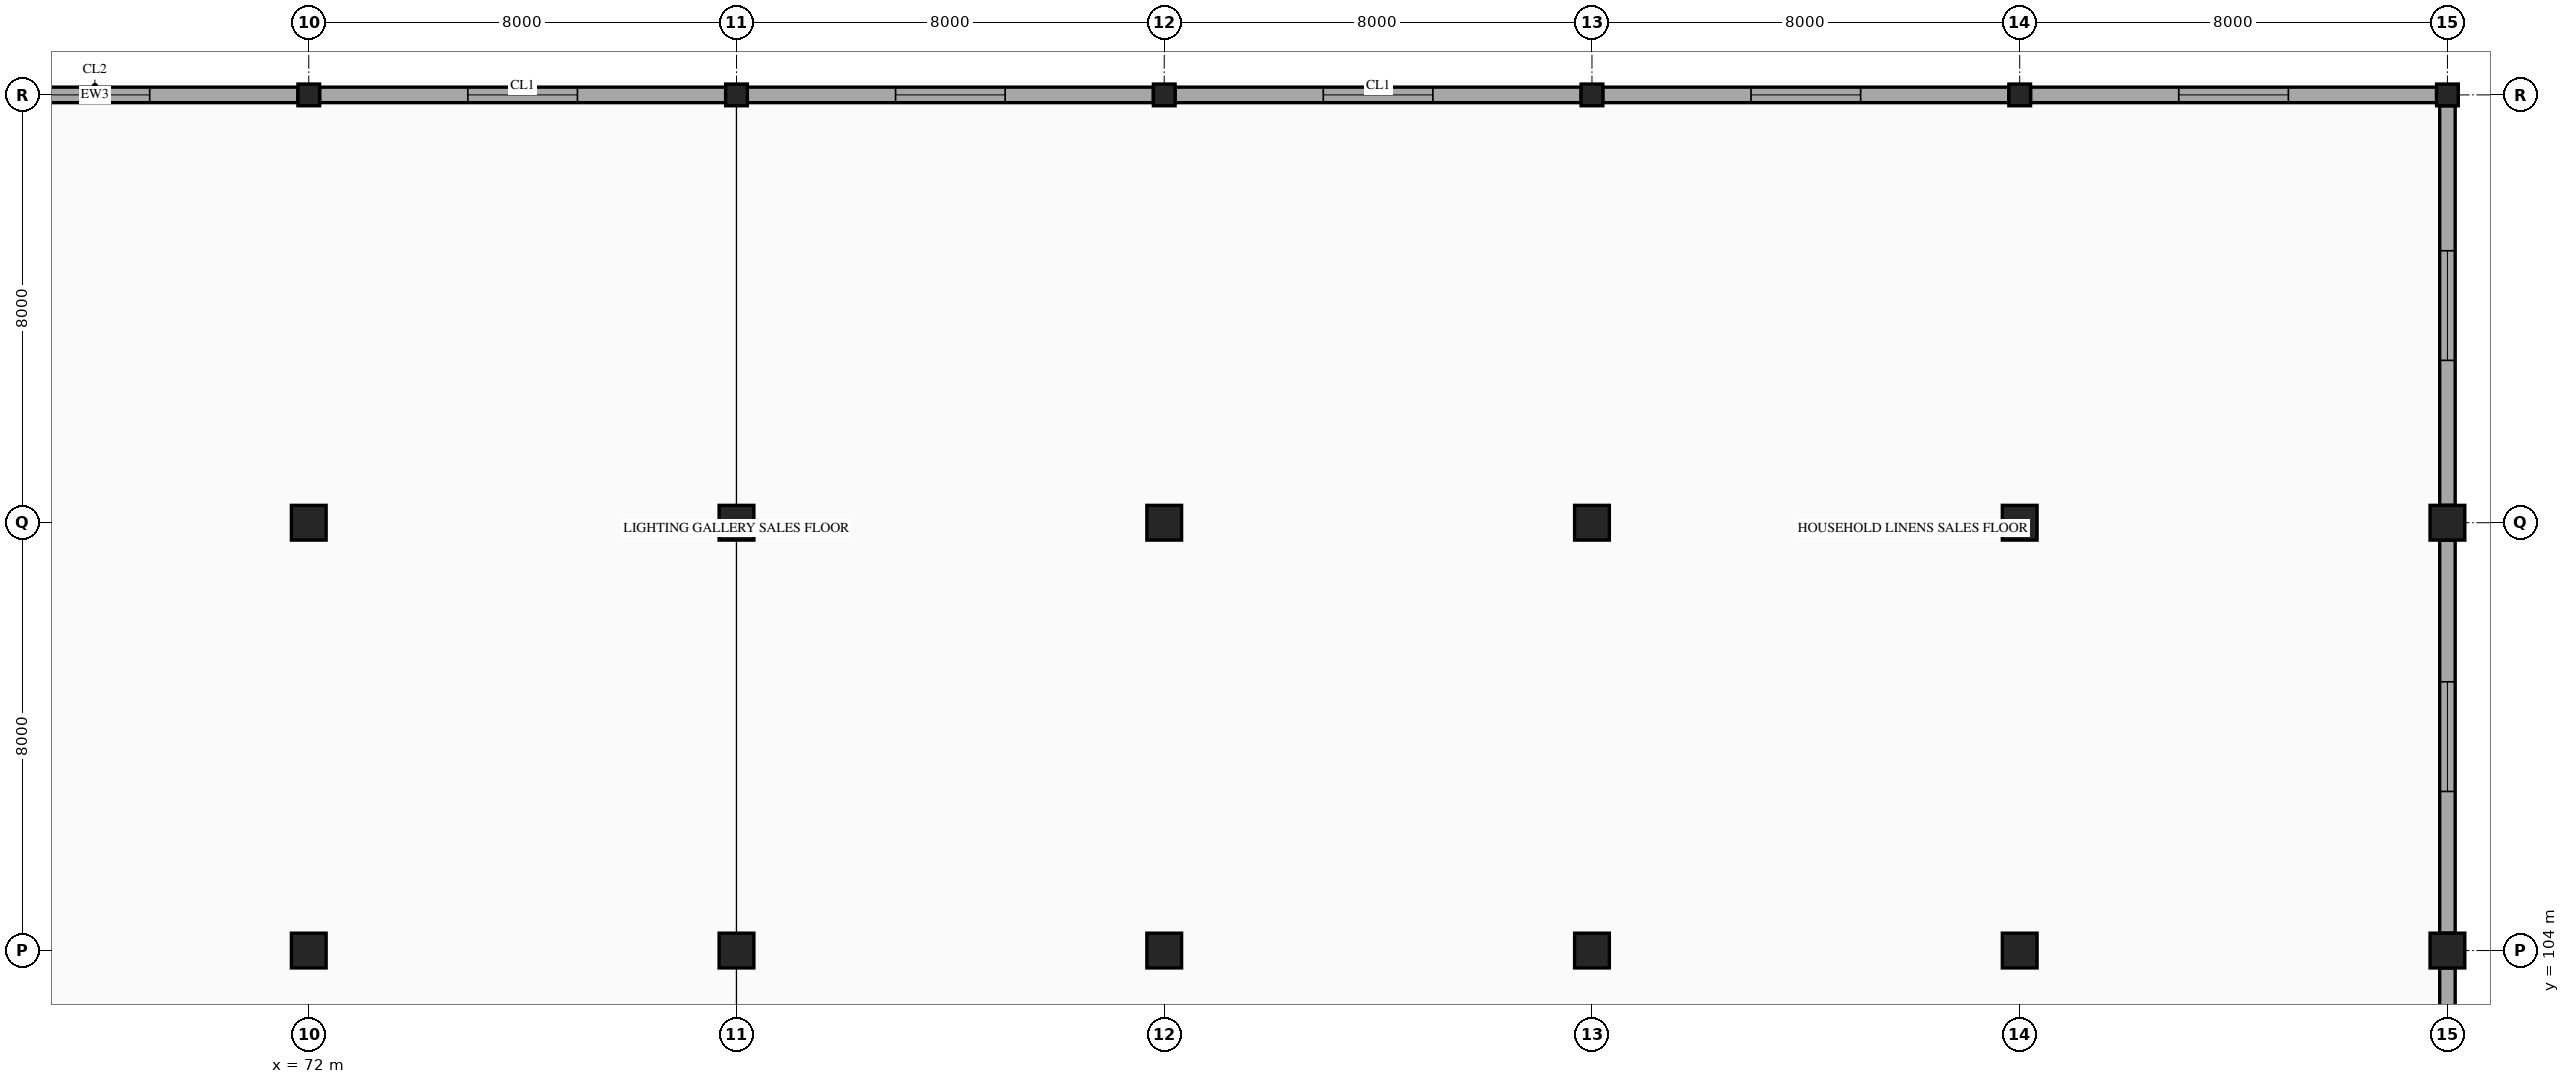
"""IFC4 building model, lengths in metres.
Left out: names, types, materials, properties, quantities, classifications, styles, units other than length and angle.
Written with IfcOpenShell. Run it as: python <this file> out.ifc"""

import sys

from ifc_helpers import new_model, si_unit, direction, frame, frame_2d, origin, origin_2d, place, context, subcontext, project, spatial, rectangle, hollow_rectangle, extrude, element, fill, save


model = new_model("IFC4")
c1 = context("Model", 3, precision=1e-05, world=origin(), true_north=direction((0.0, 1.0)))
c2 = subcontext(c1, "Body", "Model", "MODEL_VIEW")
j1 = project(units=[si_unit("LENGTHUNIT", "METRE"), si_unit("PLANEANGLEUNIT", "RADIAN")], contexts=[c1])
p1 = place(None, origin())
s1 = spatial("IfcSite", under=j1, at=p1, CompositionType="ELEMENT")
p2 = place(p1, origin())
s2 = spatial("IfcBuilding", under=s1, at=p2, CompositionType="ELEMENT")
p3 = place(p2, frame((0.0, 0.0, 19.4)))
s3 = spatial("IfcBuildingStorey", under=s2, at=p3, CompositionType="ELEMENT", Elevation=19.4)
for number, where, z_axis, x_axis in (
    (1, (72.0, 104.0, 0.0), (0.0, 0.0, 1.0), (1.0, 0.0, 0.0)),
    (2, (72.0, 112.0, 0.0), (0.0, 0.0, 1.0), (1.0, 0.0, 0.0)),
):
    element("IfcColumn", number, at=place(p3, frame(where, z_axis=z_axis, x_axis=x_axis)), inside=s3, PredefinedType="COLUMN", context=c2, shape_type="SweptSolid", body=[
        extrude(rectangle(XDim=0.65, YDim=0.65, at=origin_2d()), origin(), (0.0, 0.0, 1.0), 4.5),
    ])
p4 = place(p3, frame((72.0, 120.0, 0.0), z_axis=(0.0, 0.0, 1.0), x_axis=(1.0, 0.0, 0.0)))
e3 = element("IfcColumn", 3, at=p4, inside=s3, PredefinedType="COLUMN", context=c2, shape_type="SweptSolid", body=[
    extrude(hollow_rectangle(XDim=0.406, YDim=0.406, WallThickness=0.015, InnerFilletRadius=0.015, OuterFilletRadius=0.029, at=origin_2d()), origin(), (0.0, 0.0, 1.0), 4.5),
])
for number, where, z_axis, x_axis in (
    (4, (80.0, 104.0, 0.0), (0.0, 0.0, 1.0), (1.0, 0.0, 0.0)),
    (5, (80.0, 112.0, 0.0), (0.0, 0.0, 1.0), (1.0, 0.0, 0.0)),
):
    element("IfcColumn", number, at=place(p3, frame(where, z_axis=z_axis, x_axis=x_axis)), inside=s3, PredefinedType="COLUMN", context=c2, shape_type="SweptSolid", body=[
        extrude(rectangle(XDim=0.65, YDim=0.65, at=origin_2d()), origin(), (0.0, 0.0, 1.0), 4.5),
    ])
p5 = place(p3, frame((80.0, 120.0, 0.0), z_axis=(0.0, 0.0, 1.0), x_axis=(1.0, 0.0, 0.0)))
e6 = element("IfcColumn", 6, at=p5, inside=s3, PredefinedType="COLUMN", context=c2, shape_type="SweptSolid", body=[
    extrude(hollow_rectangle(XDim=0.406, YDim=0.406, WallThickness=0.015, InnerFilletRadius=0.015, OuterFilletRadius=0.029, at=origin_2d()), origin(), (0.0, 0.0, 1.0), 4.5),
])
for number, where, z_axis, x_axis in (
    (7, (88.0, 104.0, 0.0), (0.0, 0.0, 1.0), (1.0, 0.0, 0.0)),
    (8, (88.0, 112.0, 0.0), (0.0, 0.0, 1.0), (1.0, 0.0, 0.0)),
):
    element("IfcColumn", number, at=place(p3, frame(where, z_axis=z_axis, x_axis=x_axis)), inside=s3, PredefinedType="COLUMN", context=c2, shape_type="SweptSolid", body=[
        extrude(rectangle(XDim=0.65, YDim=0.65, at=origin_2d()), origin(), (0.0, 0.0, 1.0), 4.5),
    ])
p6 = place(p3, frame((88.0, 120.0, 0.0), z_axis=(0.0, 0.0, 1.0), x_axis=(1.0, 0.0, 0.0)))
e9 = element("IfcColumn", 9, at=p6, inside=s3, PredefinedType="COLUMN", context=c2, shape_type="SweptSolid", body=[
    extrude(hollow_rectangle(XDim=0.406, YDim=0.406, WallThickness=0.015, InnerFilletRadius=0.015, OuterFilletRadius=0.029, at=origin_2d()), origin(), (0.0, 0.0, 1.0), 4.5),
])
for number, where, z_axis, x_axis in (
    (10, (96.0, 104.0, 0.0), (0.0, 0.0, 1.0), (1.0, 0.0, 0.0)),
    (11, (96.0, 112.0, 0.0), (0.0, 0.0, 1.0), (1.0, 0.0, 0.0)),
):
    element("IfcColumn", number, at=place(p3, frame(where, z_axis=z_axis, x_axis=x_axis)), inside=s3, PredefinedType="COLUMN", context=c2, shape_type="SweptSolid", body=[
        extrude(rectangle(XDim=0.65, YDim=0.65, at=origin_2d()), origin(), (0.0, 0.0, 1.0), 4.5),
    ])
p7 = place(p3, frame((96.0, 120.0, 0.0), z_axis=(0.0, 0.0, 1.0), x_axis=(1.0, 0.0, 0.0)))
e12 = element("IfcColumn", 12, at=p7, inside=s3, PredefinedType="COLUMN", context=c2, shape_type="SweptSolid", body=[
    extrude(hollow_rectangle(XDim=0.406, YDim=0.406, WallThickness=0.015, InnerFilletRadius=0.015, OuterFilletRadius=0.029, at=origin_2d()), origin(), (0.0, 0.0, 1.0), 4.5),
])
for number, where, z_axis, x_axis in (
    (13, (104.0, 104.0, 0.0), (0.0, 0.0, 1.0), (1.0, 0.0, 0.0)),
    (14, (104.0, 112.0, 0.0), (0.0, 0.0, 1.0), (1.0, 0.0, 0.0)),
):
    element("IfcColumn", number, at=place(p3, frame(where, z_axis=z_axis, x_axis=x_axis)), inside=s3, PredefinedType="COLUMN", context=c2, shape_type="SweptSolid", body=[
        extrude(rectangle(XDim=0.65, YDim=0.65, at=origin_2d()), origin(), (0.0, 0.0, 1.0), 4.5),
    ])
p8 = place(p3, frame((104.0, 120.0, 0.0), z_axis=(0.0, 0.0, 1.0), x_axis=(1.0, 0.0, 0.0)))
e15 = element("IfcColumn", 15, at=p8, inside=s3, PredefinedType="COLUMN", context=c2, shape_type="SweptSolid", body=[
    extrude(hollow_rectangle(XDim=0.406, YDim=0.406, WallThickness=0.015, InnerFilletRadius=0.015, OuterFilletRadius=0.029, at=origin_2d()), origin(), (0.0, 0.0, 1.0), 4.5),
])
for number, where, z_axis, x_axis in (
    (16, (112.0, 104.0, 0.0), (0.0, 0.0, 1.0), (1.0, 0.0, 0.0)),
    (17, (112.0, 112.0, 0.0), (0.0, 0.0, 1.0), (1.0, 0.0, 0.0)),
):
    element("IfcColumn", number, at=place(p3, frame(where, z_axis=z_axis, x_axis=x_axis)), inside=s3, PredefinedType="COLUMN", context=c2, shape_type="SweptSolid", body=[
        extrude(rectangle(XDim=0.65, YDim=0.65, at=origin_2d()), origin(), (0.0, 0.0, 1.0), 4.5),
    ])
p9 = place(p3, frame((112.0, 120.0, 0.0), z_axis=(0.0, 0.0, 1.0), x_axis=(1.0, 0.0, 0.0)))
e18 = element("IfcColumn", 18, at=p9, inside=s3, PredefinedType="COLUMN", context=c2, shape_type="SweptSolid", body=[
    extrude(hollow_rectangle(XDim=0.406, YDim=0.406, WallThickness=0.015, InnerFilletRadius=0.015, OuterFilletRadius=0.029, at=origin_2d()), origin(), (0.0, 0.0, 1.0), 4.5),
])
p10 = place(p3, frame((64.203, 120.0, 0.0), z_axis=(0.0, 0.0, 1.0), x_axis=(1.0, 0.0, 0.0)))
e19 = element("IfcWall", 19, at=p10, inside=s3, PredefinedType="STANDARD", context=c2, shape_type="SweptSolid", body=[
    extrude(rectangle(XDim=7.594, YDim=0.29, at=frame_2d((3.797, 0.0))), origin(), (0.0, 0.0, 1.0), 3.48),
])
p11 = place(p10, frame((2.772, 0.0, 0.8)))
e20 = element("IfcOpeningElement", 20, at=p11, cuts=e19, PredefinedType="OPENING", context=c2, shape_type="SweptSolid", body=[
    extrude(rectangle(XDim=2.05, YDim=1.95, at=frame_2d((1.025, 0.975))), frame((0.0, 0.155, 0.0), z_axis=(0.0, -1.0, 0.0), x_axis=(1.0, 0.0, 0.0)), (0.0, 0.0, 1.0), 0.31),
])
p12 = place(p3, frame((72.203, 120.0, 0.0), z_axis=(0.0, 0.0, 1.0), x_axis=(1.0, 0.0, 0.0)))
e21 = element("IfcWall", 21, at=p12, inside=s3, PredefinedType="STANDARD", context=c2, shape_type="SweptSolid", body=[
    extrude(rectangle(XDim=7.594, YDim=0.29, at=frame_2d((3.797, 0.0))), origin(), (0.0, 0.0, 1.0), 3.48),
])
p13 = place(p12, frame((2.772, 0.0, 0.8)))
e22 = element("IfcOpeningElement", 22, at=p13, cuts=e21, PredefinedType="OPENING", context=c2, shape_type="SweptSolid", body=[
    extrude(rectangle(XDim=2.05, YDim=1.95, at=frame_2d((1.025, 0.975))), frame((0.0, 0.155, 0.0), z_axis=(0.0, -1.0, 0.0), x_axis=(1.0, 0.0, 0.0)), (0.0, 0.0, 1.0), 0.31),
])
p14 = place(p3, frame((80.203, 120.0, 0.0), z_axis=(0.0, 0.0, 1.0), x_axis=(1.0, 0.0, 0.0)))
e23 = element("IfcWall", 23, at=p14, inside=s3, PredefinedType="STANDARD", context=c2, shape_type="SweptSolid", body=[
    extrude(rectangle(XDim=7.594, YDim=0.29, at=frame_2d((3.797, 0.0))), origin(), (0.0, 0.0, 1.0), 3.48),
])
p15 = place(p14, frame((2.772, 0.0, 0.8)))
e24 = element("IfcOpeningElement", 24, at=p15, cuts=e23, PredefinedType="OPENING", context=c2, shape_type="SweptSolid", body=[
    extrude(rectangle(XDim=2.05, YDim=1.95, at=frame_2d((1.025, 0.975))), frame((0.0, 0.155, 0.0), z_axis=(0.0, -1.0, 0.0), x_axis=(1.0, 0.0, 0.0)), (0.0, 0.0, 1.0), 0.31),
])
p16 = place(p3, frame((88.203, 120.0, 0.0), z_axis=(0.0, 0.0, 1.0), x_axis=(1.0, 0.0, 0.0)))
e25 = element("IfcWall", 25, at=p16, inside=s3, PredefinedType="STANDARD", context=c2, shape_type="SweptSolid", body=[
    extrude(rectangle(XDim=7.594, YDim=0.29, at=frame_2d((3.797, 0.0))), origin(), (0.0, 0.0, 1.0), 3.48),
])
p17 = place(p16, frame((2.772, 0.0, 0.8)))
e26 = element("IfcOpeningElement", 26, at=p17, cuts=e25, PredefinedType="OPENING", context=c2, shape_type="SweptSolid", body=[
    extrude(rectangle(XDim=2.05, YDim=1.95, at=frame_2d((1.025, 0.975))), frame((0.0, 0.155, 0.0), z_axis=(0.0, -1.0, 0.0), x_axis=(1.0, 0.0, 0.0)), (0.0, 0.0, 1.0), 0.31),
])
p18 = place(p3, frame((96.203, 120.0, 0.0), z_axis=(0.0, 0.0, 1.0), x_axis=(1.0, 0.0, 0.0)))
e27 = element("IfcWall", 27, at=p18, inside=s3, PredefinedType="STANDARD", context=c2, shape_type="SweptSolid", body=[
    extrude(rectangle(XDim=7.594, YDim=0.29, at=frame_2d((3.797, 0.0))), origin(), (0.0, 0.0, 1.0), 3.48),
])
p19 = place(p18, frame((2.772, 0.0, 0.8)))
e28 = element("IfcOpeningElement", 28, at=p19, cuts=e27, PredefinedType="OPENING", context=c2, shape_type="SweptSolid", body=[
    extrude(rectangle(XDim=2.05, YDim=1.95, at=frame_2d((1.025, 0.975))), frame((0.0, 0.155, 0.0), z_axis=(0.0, -1.0, 0.0), x_axis=(1.0, 0.0, 0.0)), (0.0, 0.0, 1.0), 0.31),
])
p20 = place(p3, frame((104.203, 120.0, 0.0), z_axis=(0.0, 0.0, 1.0), x_axis=(1.0, 0.0, 0.0)))
e29 = element("IfcWall", 29, at=p20, inside=s3, PredefinedType="STANDARD", context=c2, shape_type="SweptSolid", body=[
    extrude(rectangle(XDim=7.594, YDim=0.29, at=frame_2d((3.797, 0.0))), origin(), (0.0, 0.0, 1.0), 3.48),
])
p21 = place(p20, frame((2.772, 0.0, 0.8)))
e30 = element("IfcOpeningElement", 30, at=p21, cuts=e29, PredefinedType="OPENING", context=c2, shape_type="SweptSolid", body=[
    extrude(rectangle(XDim=2.05, YDim=1.95, at=frame_2d((1.025, 0.975))), frame((0.0, 0.155, 0.0), z_axis=(0.0, -1.0, 0.0), x_axis=(1.0, 0.0, 0.0)), (0.0, 0.0, 1.0), 0.31),
])
p22 = place(p3, frame((112.0, 119.797, 0.0), z_axis=(0.0, 0.0, 1.0), x_axis=(0.0, -1.0, 0.0)))
e31 = element("IfcWall", 31, at=p22, inside=s3, PredefinedType="STANDARD", context=c2, shape_type="SweptSolid", body=[
    extrude(rectangle(XDim=7.472, YDim=0.29, at=frame_2d((3.736, 0.0))), origin(), (0.0, 0.0, 1.0), 3.48),
])
p23 = place(p22, frame((2.711, 0.0, 0.8)))
e32 = element("IfcOpeningElement", 32, at=p23, cuts=e31, PredefinedType="OPENING", context=c2, shape_type="SweptSolid", body=[
    extrude(rectangle(XDim=2.05, YDim=1.95, at=frame_2d((1.025, 0.975))), frame((0.0, 0.155, 0.0), z_axis=(0.0, -1.0, 0.0), x_axis=(1.0, 0.0, 0.0)), (0.0, 0.0, 1.0), 0.31),
])
p24 = place(p3, frame((112.0, 111.675, 0.0), z_axis=(0.0, 0.0, 1.0), x_axis=(0.0, -1.0, 0.0)))
e33 = element("IfcWall", 33, at=p24, inside=s3, PredefinedType="STANDARD", context=c2, shape_type="SweptSolid", body=[
    extrude(rectangle(XDim=7.35, YDim=0.29, at=frame_2d((3.675, 0.0))), origin(), (0.0, 0.0, 1.0), 3.48),
])
p25 = place(p24, frame((2.65, 0.0, 0.8)))
e34 = element("IfcOpeningElement", 34, at=p25, cuts=e33, PredefinedType="OPENING", context=c2, shape_type="SweptSolid", body=[
    extrude(rectangle(XDim=2.05, YDim=1.95, at=frame_2d((1.025, 0.975))), frame((0.0, 0.155, 0.0), z_axis=(0.0, -1.0, 0.0), x_axis=(1.0, 0.0, 0.0)), (0.0, 0.0, 1.0), 0.31),
])
p26 = place(p3, frame((112.0, 103.675, 0.0), z_axis=(0.0, 0.0, 1.0), x_axis=(0.0, -1.0, 0.0)))
e35 = element("IfcWall", 35, at=p26, inside=s3, PredefinedType="STANDARD", context=c2, shape_type="SweptSolid", body=[
    extrude(rectangle(XDim=7.35, YDim=0.29, at=frame_2d((3.675, 0.0))), origin(), (0.0, 0.0, 1.0), 3.48),
])
p27 = place(p11, origin())
e36 = element("IfcWindow", 36, at=p27, inside=s3, PartitioningType="DOUBLE_PANEL_VERTICAL", PredefinedType="WINDOW", context=c2, shape_type="SweptSolid", body=[
    extrude(rectangle(XDim=2.05, YDim=1.95, at=frame_2d((1.025, 0.975))), frame((0.0, 0.03, 0.0), z_axis=(0.0, -1.0, 0.0), x_axis=(1.0, 0.0, 0.0)), (0.0, 0.0, 1.0), 0.06),
])
fill(e20, e36)
p28 = place(p13, origin())
e37 = element("IfcWindow", 37, at=p28, inside=s3, PartitioningType="DOUBLE_PANEL_VERTICAL", PredefinedType="WINDOW", context=c2, shape_type="SweptSolid", body=[
    extrude(rectangle(XDim=2.05, YDim=1.95, at=frame_2d((1.025, 0.975))), frame((0.0, 0.03, 0.0), z_axis=(0.0, -1.0, 0.0), x_axis=(1.0, 0.0, 0.0)), (0.0, 0.0, 1.0), 0.06),
])
fill(e22, e37)
p29 = place(p15, origin())
e38 = element("IfcWindow", 38, at=p29, inside=s3, PartitioningType="DOUBLE_PANEL_VERTICAL", PredefinedType="WINDOW", context=c2, shape_type="SweptSolid", body=[
    extrude(rectangle(XDim=2.05, YDim=1.95, at=frame_2d((1.025, 0.975))), frame((0.0, 0.03, 0.0), z_axis=(0.0, -1.0, 0.0), x_axis=(1.0, 0.0, 0.0)), (0.0, 0.0, 1.0), 0.06),
])
fill(e24, e38)
p30 = place(p17, origin())
e39 = element("IfcWindow", 39, at=p30, inside=s3, PartitioningType="DOUBLE_PANEL_VERTICAL", PredefinedType="WINDOW", context=c2, shape_type="SweptSolid", body=[
    extrude(rectangle(XDim=2.05, YDim=1.95, at=frame_2d((1.025, 0.975))), frame((0.0, 0.03, 0.0), z_axis=(0.0, -1.0, 0.0), x_axis=(1.0, 0.0, 0.0)), (0.0, 0.0, 1.0), 0.06),
])
fill(e26, e39)
p31 = place(p19, origin())
e40 = element("IfcWindow", 40, at=p31, inside=s3, PartitioningType="DOUBLE_PANEL_VERTICAL", PredefinedType="WINDOW", context=c2, shape_type="SweptSolid", body=[
    extrude(rectangle(XDim=2.05, YDim=1.95, at=frame_2d((1.025, 0.975))), frame((0.0, 0.03, 0.0), z_axis=(0.0, -1.0, 0.0), x_axis=(1.0, 0.0, 0.0)), (0.0, 0.0, 1.0), 0.06),
])
fill(e28, e40)
p32 = place(p21, origin())
e41 = element("IfcWindow", 41, at=p32, inside=s3, PartitioningType="DOUBLE_PANEL_VERTICAL", PredefinedType="WINDOW", context=c2, shape_type="SweptSolid", body=[
    extrude(rectangle(XDim=2.05, YDim=1.95, at=frame_2d((1.025, 0.975))), frame((0.0, 0.03, 0.0), z_axis=(0.0, -1.0, 0.0), x_axis=(1.0, 0.0, 0.0)), (0.0, 0.0, 1.0), 0.06),
])
fill(e30, e41)
p33 = place(p23, origin())
e42 = element("IfcWindow", 42, at=p33, inside=s3, PartitioningType="DOUBLE_PANEL_VERTICAL", PredefinedType="WINDOW", context=c2, shape_type="SweptSolid", body=[
    extrude(rectangle(XDim=2.05, YDim=1.95, at=frame_2d((1.025, 0.975))), frame((0.0, 0.03, 0.0), z_axis=(0.0, -1.0, 0.0), x_axis=(1.0, 0.0, 0.0)), (0.0, 0.0, 1.0), 0.06),
])
fill(e32, e42)
p34 = place(p25, origin())
e43 = element("IfcWindow", 43, at=p34, inside=s3, PartitioningType="DOUBLE_PANEL_VERTICAL", PredefinedType="WINDOW", context=c2, shape_type="SweptSolid", body=[
    extrude(rectangle(XDim=2.05, YDim=1.95, at=frame_2d((1.025, 0.975))), frame((0.0, 0.03, 0.0), z_axis=(0.0, -1.0, 0.0), x_axis=(1.0, 0.0, 0.0)), (0.0, 0.0, 1.0), 0.06),
])
fill(e34, e43)
save(model, sys.argv[1])
